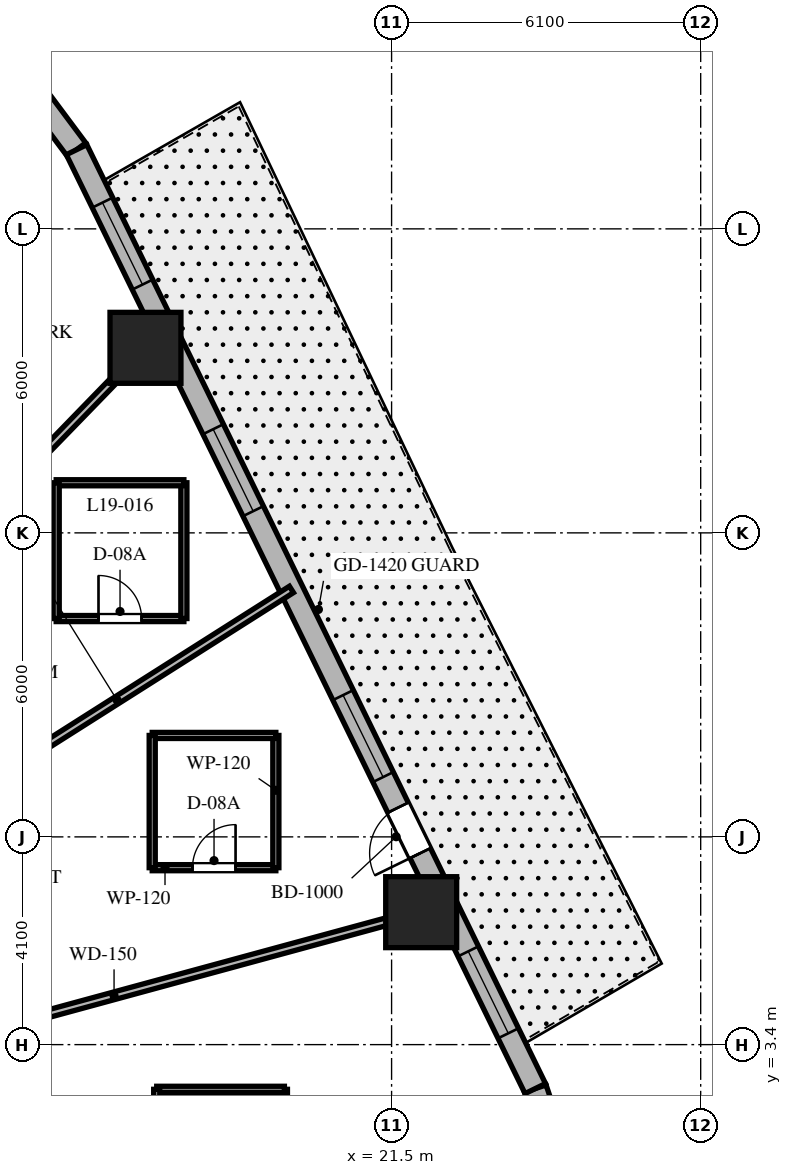
"""IFC4 building model, lengths in metres.
Left out: names, types, materials, properties, quantities, classifications, styles, units other than length and angle.
Written with IfcOpenShell. Run it as: python <this file> out.ifc"""

import sys

from ifc_helpers import new_model, si_unit, direction, frame, frame_2d, origin, origin_2d, place, context, subcontext, project, spatial, rectangle, extrude, element, fill, save


model = new_model("IFC4")
c1 = context("Model", 3, precision=1e-05, world=origin(), true_north=direction((0.0, 1.0)))
c2 = subcontext(c1, "Body", "Model", "MODEL_VIEW")
j1 = project(units=[si_unit("LENGTHUNIT", "METRE"), si_unit("PLANEANGLEUNIT", "RADIAN")], contexts=[c1])
p1 = place(None, origin())
s1 = spatial("IfcSite", under=j1, at=p1, CompositionType="ELEMENT")
p2 = place(p1, origin())
s2 = spatial("IfcBuilding", under=s1, at=p2, CompositionType="ELEMENT")
p3 = place(p2, frame((0.0, 0.0, 82.3)))
s3 = spatial("IfcBuildingStorey", under=s2, at=p3, CompositionType="ELEMENT", Elevation=82.3)
for number, where, z_axis, x_axis in (
    (1, (22.084, 6.014, 0.0), (0.0, 0.0, 1.0), (1.0, 0.0, 0.0)),
    (2, (16.643, 17.152, 0.0), (0.0, 0.0, 1.0), (1.0, 0.0, 0.0)),
):
    element("IfcColumn", number, at=place(p3, frame(where, z_axis=z_axis, x_axis=x_axis)), inside=s3, PredefinedType="COLUMN", context=c2, shape_type="SweptSolid", body=[
        extrude(rectangle(XDim=1.4, YDim=1.4, at=origin_2d()), origin(), (0.0, 0.0, 1.0), 3.7),
    ])
p4 = place(p3, frame((24.621, 1.682, 0.0), z_axis=(0.0, 0.0, 1.0), x_axis=(-0.317697451681, 0.948192137278, 0.0)))
e3 = element("IfcWall", 3, at=p4, inside=s3, PredefinedType="SOLIDWALL", context=c2, shape_type="SweptSolid", body=[
    extrude(rectangle(XDim=0.897, YDim=0.45, at=frame_2d((0.448, 0.0))), origin(), (0.0, 0.0, 1.0), 3.38),
])
p5 = place(p3, frame((15.284, 21.062, 0.0), z_axis=(0.0, 0.0, 1.0), x_axis=(-0.597595366449, 0.801797841104, 0.0)))
e4 = element("IfcWall", 4, at=p5, inside=s3, PredefinedType="SOLIDWALL", context=c2, shape_type="SweptSolid", body=[
    extrude(rectangle(XDim=1.269, YDim=0.45, at=frame_2d((0.634, 0.0))), origin(), (0.0, 0.0, 1.0), 3.38),
])
p6 = place(p3, frame((24.336, 2.532, 0.0), z_axis=(0.0, 0.0, 1.0), x_axis=(-0.438931326393, 0.898520612291, 0.0)))
e5 = element("IfcWall", 5, at=p6, inside=s3, PredefinedType="SOLIDWALL", context=c2, shape_type="SweptSolid", body=[
    extrude(rectangle(XDim=20.623, YDim=0.45, at=frame_2d((10.312, 0.0))), origin(), (0.0, 0.0, 1.0), 3.38),
])
p7 = place(p6, frame((5.171, 0.0, 0.0)))
e6 = element("IfcOpeningElement", 6, at=p7, cuts=e5, PredefinedType="OPENING", context=c2, shape_type="SweptSolid", body=[
    extrude(rectangle(XDim=1.0, YDim=2.15, at=frame_2d((0.5, 1.075))), frame((0.0, 0.235, 0.0), z_axis=(0.0, -1.0, 0.0), x_axis=(1.0, 0.0, 0.0)), (0.0, 0.0, 1.0), 0.47),
])
p8 = place(p6, frame((6.842, 0.0, 0.8)))
e7 = element("IfcOpeningElement", 7, at=p8, cuts=e5, PredefinedType="OPENING", context=c2, shape_type="SweptSolid", body=[
    extrude(rectangle(XDim=1.8, YDim=1.8, at=frame_2d((0.9, 0.9))), frame((0.0, 0.235, 0.0), z_axis=(0.0, -1.0, 0.0), x_axis=(1.0, 0.0, 0.0)), (0.0, 0.0, 1.0), 0.47),
])
p9 = place(p6, frame((12.683, 0.0, 0.8)))
e8 = element("IfcOpeningElement", 8, at=p9, cuts=e5, PredefinedType="OPENING", context=c2, shape_type="SweptSolid", body=[
    extrude(rectangle(XDim=1.8, YDim=1.8, at=frame_2d((0.9, 0.9))), frame((0.0, 0.235, 0.0), z_axis=(0.0, -1.0, 0.0), x_axis=(1.0, 0.0, 0.0)), (0.0, 0.0, 1.0), 0.47),
])
p10 = place(p6, frame((17.66, 0.0, 0.8)))
e9 = element("IfcOpeningElement", 9, at=p10, cuts=e5, PredefinedType="OPENING", context=c2, shape_type="SweptSolid", body=[
    extrude(rectangle(XDim=1.8, YDim=1.8, at=frame_2d((0.9, 0.9))), frame((0.0, 0.235, 0.0), z_axis=(0.0, -1.0, 0.0), x_axis=(1.0, 0.0, 0.0)), (0.0, 0.0, 1.0), 0.47),
])
p11 = place(p6, frame((1.214, 0.0, 0.8)))
e10 = element("IfcOpeningElement", 10, at=p11, cuts=e5, PredefinedType="OPENING", context=c2, shape_type="SweptSolid", body=[
    extrude(rectangle(XDim=1.8, YDim=1.8, at=frame_2d((0.9, 0.9))), frame((0.0, 0.235, 0.0), z_axis=(0.0, -1.0, 0.0), x_axis=(1.0, 0.0, 0.0)), (0.0, 0.0, 1.0), 0.47),
])
p12 = place(p3, frame((11.35, 3.091, 0.0), z_axis=(0.0, 0.0, 1.0), x_axis=(0.964859685283, 0.262765651704, 0.0)))
e11 = element("IfcWall", 11, at=p12, inside=s3, PredefinedType="PARTITIONING", context=c2, shape_type="SweptSolid", body=[
    extrude(rectangle(XDim=11.629, YDim=0.15, at=frame_2d((5.814, 0.0))), origin(), (0.0, 0.0, 1.0), 2.52),
])
p13 = place(p3, frame((11.35, 7.199, 0.0), z_axis=(0.0, 0.0, 1.0), x_axis=(0.844458213289, 0.535621439087, 0.0)))
e12 = element("IfcWall", 12, at=p13, inside=s3, PredefinedType="PARTITIONING", context=c2, shape_type="SweptSolid", body=[
    extrude(rectangle(XDim=9.679, YDim=0.15, at=frame_2d((4.84, 0.0))), origin(), (0.0, 0.0, 1.0), 2.52),
])
p14 = place(p3, frame((9.558, 9.85, 0.0), z_axis=(0.0, 0.0, 1.0), x_axis=(0.69638346089, 0.717669893056, 0.0)))
e13 = element("IfcWall", 13, at=p14, inside=s3, PredefinedType="PARTITIONING", context=c2, shape_type="SweptSolid", body=[
    extrude(rectangle(XDim=10.701, YDim=0.15, at=frame_2d((5.351, 0.0))), origin(), (0.0, 0.0, 1.0), 2.52),
])
p15 = place(p3, frame((16.776, 6.892, 0.0), z_axis=(0.0, 0.0, 1.0), x_axis=(1.0, 0.0, 0.0)))
e14 = element("IfcWall", 14, at=p15, inside=s3, PredefinedType="PARTITIONING", context=c2, shape_type="SweptSolid", body=[
    extrude(rectangle(XDim=2.44, YDim=0.12, at=frame_2d((1.22, 0.0))), origin(), (0.0, 0.0, 1.0), 2.906),
])
p16 = place(p15, frame((0.795, 0.0, 0.0)))
e15 = element("IfcOpeningElement", 15, at=p16, cuts=e14, PredefinedType="OPENING", context=c2, shape_type="SweptSolid", body=[
    extrude(rectangle(XDim=0.85, YDim=2.03, at=frame_2d((0.425, 1.015))), frame((0.0, 0.07, 0.0), z_axis=(0.0, -1.0, 0.0), x_axis=(1.0, 0.0, 0.0)), (0.0, 0.0, 1.0), 0.14),
])
p17 = place(p3, frame((19.216, 6.892, 0.0), z_axis=(0.0, 0.0, 1.0), x_axis=(0.0, 1.0, 0.0)))
e16 = element("IfcWall", 16, at=p17, inside=s3, PredefinedType="PARTITIONING", context=c2, shape_type="SweptSolid", body=[
    extrude(rectangle(XDim=2.61, YDim=0.12, at=frame_2d((1.305, 0.0))), origin(), (0.0, 0.0, 1.0), 3.38),
])
p18 = place(p3, frame((19.216, 9.502, 0.0), z_axis=(0.0, 0.0, 1.0), x_axis=(-1.0, 0.0, 0.0)))
e17 = element("IfcWall", 17, at=p18, inside=s3, PredefinedType="PARTITIONING", context=c2, shape_type="SweptSolid", body=[
    extrude(rectangle(XDim=2.44, YDim=0.12, at=frame_2d((1.22, 0.0))), origin(), (0.0, 0.0, 1.0), 3.38),
])
p19 = place(p3, frame((16.776, 9.502, 0.0), z_axis=(0.0, 0.0, 1.0), x_axis=(0.0, -1.0, 0.0)))
e18 = element("IfcWall", 18, at=p19, inside=s3, PredefinedType="PARTITIONING", context=c2, shape_type="SweptSolid", body=[
    extrude(rectangle(XDim=2.61, YDim=0.12, at=frame_2d((1.305, 0.0))), origin(), (0.0, 0.0, 1.0), 2.906),
])
p20 = place(p3, frame((14.881, 11.809, 0.0), z_axis=(0.0, 0.0, 1.0), x_axis=(1.0, 0.0, 0.0)))
e19 = element("IfcWall", 19, at=p20, inside=s3, PredefinedType="PARTITIONING", context=c2, shape_type="SweptSolid", body=[
    extrude(rectangle(XDim=2.52, YDim=0.12, at=frame_2d((1.26, 0.0))), origin(), (0.0, 0.0, 1.0), 2.906),
])
p21 = place(p20, frame((0.835, 0.0, 0.0)))
e20 = element("IfcOpeningElement", 20, at=p21, cuts=e19, PredefinedType="OPENING", context=c2, shape_type="SweptSolid", body=[
    extrude(rectangle(XDim=0.85, YDim=2.03, at=frame_2d((0.425, 1.015))), frame((0.0, 0.07, 0.0), z_axis=(0.0, -1.0, 0.0), x_axis=(1.0, 0.0, 0.0)), (0.0, 0.0, 1.0), 0.14),
])
p22 = place(p3, frame((17.401, 11.809, 0.0), z_axis=(0.0, 0.0, 1.0), x_axis=(0.0, 1.0, 0.0)))
e21 = element("IfcWall", 21, at=p22, inside=s3, PredefinedType="PARTITIONING", context=c2, shape_type="SweptSolid", body=[
    extrude(rectangle(XDim=2.68, YDim=0.12, at=frame_2d((1.34, 0.0))), origin(), (0.0, 0.0, 1.0), 3.38),
])
p23 = place(p3, frame((17.401, 14.489, 0.0), z_axis=(0.0, 0.0, 1.0), x_axis=(-1.0, 0.0, 0.0)))
e22 = element("IfcWall", 22, at=p23, inside=s3, PredefinedType="PARTITIONING", context=c2, shape_type="SweptSolid", body=[
    extrude(rectangle(XDim=2.52, YDim=0.12, at=frame_2d((1.26, 0.0))), origin(), (0.0, 0.0, 1.0), 3.38),
])
p24 = place(p3, frame((14.881, 14.489, 0.0), z_axis=(0.0, 0.0, 1.0), x_axis=(0.0, -1.0, 0.0)))
e23 = element("IfcWall", 23, at=p24, inside=s3, PredefinedType="PARTITIONING", context=c2, shape_type="SweptSolid", body=[
    extrude(rectangle(XDim=2.68, YDim=0.12, at=frame_2d((1.34, 0.0))), origin(), (0.0, 0.0, 1.0), 2.906),
])
p25 = place(p3, frame((19.385, -0.162, 0.0), z_axis=(0.0, 0.0, 1.0), x_axis=(0.0, 1.0, 0.0)))
e24 = element("IfcWall", 24, at=p25, inside=s3, PredefinedType="PARTITIONING", context=c2, shape_type="SweptSolid", body=[
    extrude(rectangle(XDim=2.68, YDim=0.12, at=frame_2d((1.34, 0.0))), origin(), (0.0, 0.0, 1.0), 3.38),
])
p26 = place(p3, frame((19.385, 2.518, 0.0), z_axis=(0.0, 0.0, 1.0), x_axis=(-1.0, 0.0, 0.0)))
e25 = element("IfcWall", 25, at=p26, inside=s3, PredefinedType="PARTITIONING", context=c2, shape_type="SweptSolid", body=[
    extrude(rectangle(XDim=2.52, YDim=0.12, at=frame_2d((1.26, 0.0))), origin(), (0.0, 0.0, 1.0), 2.82),
])
p27 = place(p3, frame((16.865, 2.518, 0.0), z_axis=(0.0, 0.0, 1.0), x_axis=(0.0, -1.0, 0.0)))
e26 = element("IfcWall", 26, at=p27, inside=s3, PredefinedType="PARTITIONING", context=c2, shape_type="SweptSolid", body=[
    extrude(rectangle(XDim=2.68, YDim=0.12, at=frame_2d((1.34, 0.0))), origin(), (0.0, 0.0, 1.0), 3.38),
])
p28 = place(p7, origin())
e27 = element("IfcDoor", 27, at=p28, inside=s3, OperationType="SINGLE_SWING_LEFT", PredefinedType="DOOR", context=c2, shape_type="SweptSolid", body=[
    extrude(rectangle(XDim=1.0, YDim=2.15, at=frame_2d((0.5, 1.075))), frame((0.0, 0.025, 0.0), z_axis=(0.0, -1.0, 0.0), x_axis=(1.0, 0.0, 0.0)), (0.0, 0.0, 1.0), 0.05),
])
fill(e6, e27)
p29 = place(p8, origin())
e28 = element("IfcWindow", 28, at=p29, inside=s3, PartitioningType="SINGLE_PANEL", PredefinedType="WINDOW", context=c2, shape_type="SweptSolid", body=[
    extrude(rectangle(XDim=1.8, YDim=1.8, at=frame_2d((0.9, 0.9))), frame((0.0, 0.03, 0.0), z_axis=(0.0, -1.0, 0.0), x_axis=(1.0, 0.0, 0.0)), (0.0, 0.0, 1.0), 0.06),
])
fill(e7, e28)
p30 = place(p9, origin())
e29 = element("IfcWindow", 29, at=p30, inside=s3, PartitioningType="SINGLE_PANEL", PredefinedType="WINDOW", context=c2, shape_type="SweptSolid", body=[
    extrude(rectangle(XDim=1.8, YDim=1.8, at=frame_2d((0.9, 0.9))), frame((0.0, 0.03, 0.0), z_axis=(0.0, -1.0, 0.0), x_axis=(1.0, 0.0, 0.0)), (0.0, 0.0, 1.0), 0.06),
])
fill(e8, e29)
p31 = place(p10, origin())
e30 = element("IfcWindow", 30, at=p31, inside=s3, PartitioningType="SINGLE_PANEL", PredefinedType="WINDOW", context=c2, shape_type="SweptSolid", body=[
    extrude(rectangle(XDim=1.8, YDim=1.8, at=frame_2d((0.9, 0.9))), frame((0.0, 0.03, 0.0), z_axis=(0.0, -1.0, 0.0), x_axis=(1.0, 0.0, 0.0)), (0.0, 0.0, 1.0), 0.06),
])
fill(e9, e30)
p32 = place(p11, origin())
e31 = element("IfcWindow", 31, at=p32, inside=s3, PartitioningType="SINGLE_PANEL", PredefinedType="WINDOW", context=c2, shape_type="SweptSolid", body=[
    extrude(rectangle(XDim=1.8, YDim=1.8, at=frame_2d((0.9, 0.9))), frame((0.0, 0.03, 0.0), z_axis=(0.0, -1.0, 0.0), x_axis=(1.0, 0.0, 0.0)), (0.0, 0.0, 1.0), 0.06),
])
fill(e10, e31)
p33 = place(p16, origin())
e32 = element("IfcDoor", 32, at=p33, inside=s3, OperationType="SINGLE_SWING_RIGHT", PredefinedType="DOOR", context=c2, shape_type="SweptSolid", body=[
    extrude(rectangle(XDim=0.85, YDim=2.03, at=frame_2d((0.425, 1.015))), frame((0.0, 0.025, 0.0), z_axis=(0.0, -1.0, 0.0), x_axis=(1.0, 0.0, 0.0)), (0.0, 0.0, 1.0), 0.05),
])
fill(e15, e32)
p34 = place(p21, origin())
e33 = element("IfcDoor", 33, at=p34, inside=s3, OperationType="SINGLE_SWING_LEFT", PredefinedType="DOOR", context=c2, shape_type="SweptSolid", body=[
    extrude(rectangle(XDim=0.85, YDim=2.03, at=frame_2d((0.425, 1.015))), frame((0.0, 0.025, 0.0), z_axis=(0.0, -1.0, 0.0), x_axis=(1.0, 0.0, 0.0)), (0.0, 0.0, 1.0), 0.05),
])
fill(e20, e33)
save(model, sys.argv[1])
